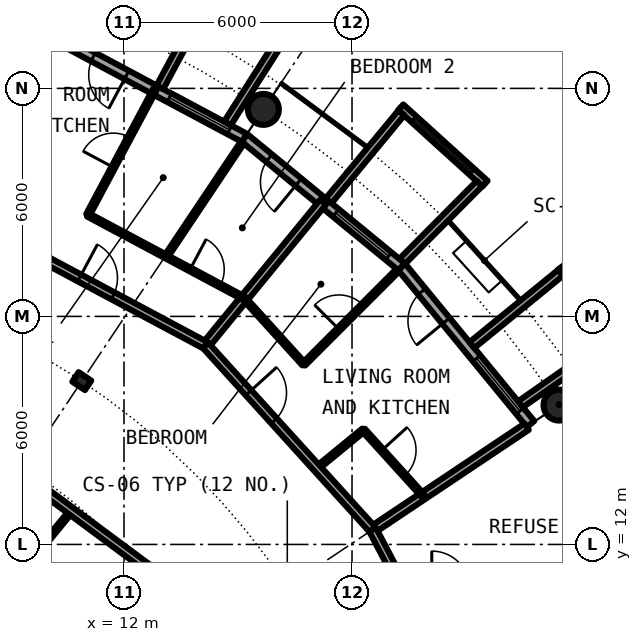
"""IFC4 building model, lengths in metres.
Left out: names, types, materials, properties, quantities, classifications, styles, units other than length and angle.
Written with IfcOpenShell. Run it as: python <this file> out.ifc"""

import sys

from ifc_helpers import new_model, si_unit, direction, frame, frame_2d, origin, origin_2d, place, context, subcontext, project, spatial, rectangle, circle, hollow_circle, i_section, extrude, element, fill, save


model = new_model("IFC4")
c1 = context("Model", 3, precision=1e-05, world=origin(), true_north=direction((0.0, 1.0)))
c2 = subcontext(c1, "Body", "Model", "MODEL_VIEW")
j1 = project(units=[si_unit("LENGTHUNIT", "METRE"), si_unit("PLANEANGLEUNIT", "RADIAN")], contexts=[c1])
p1 = place(None, origin())
s1 = spatial("IfcSite", under=j1, at=p1, CompositionType="ELEMENT")
p2 = place(p1, origin())
s2 = spatial("IfcBuilding", under=s1, at=p2, CompositionType="ELEMENT")
p3 = place(p2, frame((0.0, 0.0, 202.4)))
s3 = spatial("IfcBuildingStorey", under=s2, at=p3, CompositionType="ELEMENT", Elevation=202.4)
for number, where, z_axis, x_axis in (
    (1, (23.448, 15.667, 0.0), (0.0, 0.0, 1.0), (1.0, 0.0, 0.0)),
    (2, (15.667, 23.448, 0.0), (0.0, 0.0, 1.0), (1.0, 0.0, 0.0)),
):
    element("IfcColumn", number, at=place(p3, frame(where, z_axis=z_axis, x_axis=x_axis)), inside=s3, PredefinedType="COLUMN", context=c2, shape_type="SweptSolid", body=[
        extrude(hollow_circle(Radius=0.406, WallThickness=0.03, at=origin_2d()), origin(), (0.0, 0.0, 1.0), 3.05),
    ])
p4 = place(p3, frame((10.889, 16.297, 0.0), z_axis=(0.0, 0.0, 1.0), x_axis=(0.55557023302, 0.831469612303, 0.0)))
e3 = element("IfcColumn", 3, at=p4, inside=s3, PredefinedType="COLUMN", context=c2, shape_type="SweptSolid", body=[
    extrude(i_section(OverallWidth=0.3, OverallDepth=0.4, WebThickness=0.013, FlangeThickness=0.024, FilletRadius=0.027, at=origin_2d()), origin(), (0.0, 0.0, 1.0), 3.05),
])
p5 = place(p3, frame((22.699, 15.167, 0.0), z_axis=(0.0, 0.0, 1.0), x_axis=(-0.634382322723, 0.773019449054, 0.0)))
e4 = element("IfcWall", 4, at=p5, inside=s3, PredefinedType="SOLIDWALL", context=c2, shape_type="SweptSolid", body=[
    extrude(rectangle(XDim=5.352, YDim=0.25, at=frame_2d((2.676, 0.0))), origin(), (0.0, 0.0, 1.0), 2.7),
])
p6 = place(p5, frame((0.441, 0.0, 0.3)))
e5 = element("IfcOpeningElement", 5, at=p6, cuts=e4, PredefinedType="OPENING", context=c2, shape_type="SweptSolid", body=[
    extrude(rectangle(XDim=1.8, YDim=2.1, at=frame_2d((0.9, 1.05))), frame((0.0, 0.135, 0.0), z_axis=(0.0, -1.0, 0.0), x_axis=(1.0, 0.0, 0.0)), (0.0, 0.0, 1.0), 0.27),
])
p7 = place(p5, frame((3.51, 0.0, 0.0)))
e6 = element("IfcOpeningElement", 6, at=p7, cuts=e4, PredefinedType="OPENING", context=c2, shape_type="SweptSolid", body=[
    extrude(rectangle(XDim=1.0, YDim=2.2, at=frame_2d((0.5, 1.1))), frame((0.0, 0.135, 0.0), z_axis=(0.0, -1.0, 0.0), x_axis=(1.0, 0.0, 0.0)), (0.0, 0.0, 1.0), 0.27),
])
p8 = place(p3, frame((24.972, 17.337, -0.03), z_axis=(0.0, 0.0, 1.0), x_axis=(-0.602806268067, 0.797887588059, 0.0)))
e7 = element("IfcWall", 7, at=p8, inside=s3, PredefinedType="SOLIDWALL", context=c2, shape_type="SweptSolid", body=[
    extrude(rectangle(XDim=2.447, YDim=0.2, at=frame_2d((1.223, 0.0))), origin(), (0.0, 0.0, 1.0), 2.73),
])
p9 = place(p8, frame((0.183, 0.0, 0.33)))
e8 = element("IfcOpeningElement", 8, at=p9, cuts=e7, PredefinedType="OPENING", context=c2, shape_type="SweptSolid", body=[
    extrude(circle(Radius=1.04, at=frame_2d((1.04, 1.04))), frame((0.0, 0.11, 0.0), z_axis=(0.0, -1.0, 0.0), x_axis=(1.0, 0.0, 0.0)), (0.0, 0.0, 1.0), 0.22),
])
p10 = place(p3, frame((22.433, 15.688, -0.03), z_axis=(0.0, 0.0, 1.0), x_axis=(0.819373043115, 0.573260687834, 0.0)))
e9 = element("IfcWall", 9, at=p10, inside=s3, PredefinedType="SOLIDWALL", context=c2, shape_type="SweptSolid", body=[
    extrude(rectangle(XDim=2.925, YDim=0.2, at=frame_2d((1.463, 0.0))), origin(), (0.0, 0.0, 1.0), 2.73),
])
p11 = place(p3, frame((21.155, 17.246, -0.03), z_axis=(0.0, 0.0, 1.0), x_axis=(0.775179004516, 0.631741648902, 0.0)))
e10 = element("IfcWall", 10, at=p11, inside=s3, PredefinedType="SOLIDWALL", context=c2, shape_type="SweptSolid", body=[
    extrude(rectangle(XDim=3.006, YDim=0.2, at=frame_2d((1.503, 0.0))), origin(), (0.0, 0.0, 1.0), 2.73),
])
p12 = place(p3, frame((19.304, 19.304, 0.0), z_axis=(0.0, 0.0, 1.0), x_axis=(-0.773019449054, 0.634382322723, 0.0)))
e11 = element("IfcWall", 11, at=p12, inside=s3, PredefinedType="SOLIDWALL", context=c2, shape_type="SweptSolid", body=[
    extrude(rectangle(XDim=5.352, YDim=0.25, at=frame_2d((2.676, 0.0))), origin(), (0.0, 0.0, 1.0), 2.7),
])
p13 = place(p12, frame((0.441, 0.0, 0.3)))
e12 = element("IfcOpeningElement", 12, at=p13, cuts=e11, PredefinedType="OPENING", context=c2, shape_type="SweptSolid", body=[
    extrude(rectangle(XDim=1.8, YDim=2.1, at=frame_2d((0.9, 1.05))), frame((0.0, 0.135, 0.0), z_axis=(0.0, -1.0, 0.0), x_axis=(1.0, 0.0, 0.0)), (0.0, 0.0, 1.0), 0.27),
])
p14 = place(p12, frame((3.51, 0.0, 0.0)))
e13 = element("IfcOpeningElement", 13, at=p14, cuts=e11, PredefinedType="OPENING", context=c2, shape_type="SweptSolid", body=[
    extrude(rectangle(XDim=1.0, YDim=2.2, at=frame_2d((0.5, 1.1))), frame((0.0, 0.135, 0.0), z_axis=(0.0, -1.0, 0.0), x_axis=(1.0, 0.0, 0.0)), (0.0, 0.0, 1.0), 0.27),
])
p15 = place(p3, frame((21.5, 21.493, -0.03), z_axis=(0.0, 0.0, 1.0), x_axis=(-0.740998365753, 0.671506829416, 0.0)))
e14 = element("IfcWall", 14, at=p15, inside=s3, PredefinedType="SOLIDWALL", context=c2, shape_type="SweptSolid", body=[
    extrude(rectangle(XDim=2.993, YDim=0.2, at=frame_2d((1.497, 0.0))), origin(), (0.0, 0.0, 1.0), 2.73),
])
p16 = place(p15, frame((0.457, 0.0, 0.33)))
e15 = element("IfcOpeningElement", 15, at=p16, cuts=e14, PredefinedType="OPENING", context=c2, shape_type="SweptSolid", body=[
    extrude(circle(Radius=1.04, at=frame_2d((1.04, 1.04))), frame((0.0, 0.11, 0.0), z_axis=(0.0, -1.0, 0.0), x_axis=(1.0, 0.0, 0.0)), (0.0, 0.0, 1.0), 0.22),
])
p17 = place(p3, frame((19.323, 19.45, -0.03), z_axis=(0.0, 0.0, 1.0), x_axis=(0.704476739375, 0.709727076896, 0.0)))
e16 = element("IfcWall", 16, at=p17, inside=s3, PredefinedType="SOLIDWALL", context=c2, shape_type="SweptSolid", body=[
    extrude(rectangle(XDim=2.883, YDim=0.2, at=frame_2d((1.441, 0.0))), origin(), (0.0, 0.0, 1.0), 2.73),
])
p18 = place(p3, frame((17.384, 21.041, -0.03), z_axis=(0.0, 0.0, 1.0), x_axis=(0.63709551667, 0.770784861449, 0.0)))
e17 = element("IfcWall", 17, at=p18, inside=s3, PredefinedType="SOLIDWALL", context=c2, shape_type="SweptSolid", body=[
    extrude(rectangle(XDim=3.006, YDim=0.2, at=frame_2d((1.503, 0.0))), origin(), (0.0, 0.0, 1.0), 2.73),
])
p19 = place(p3, frame((15.167, 22.699, 0.0), z_axis=(0.0, 0.0, 1.0), x_axis=(-0.881915646801, 0.471407246368, 0.0)))
e18 = element("IfcWall", 18, at=p19, inside=s3, PredefinedType="SOLIDWALL", context=c2, shape_type="SweptSolid", body=[
    extrude(rectangle(XDim=5.352, YDim=0.25, at=frame_2d((2.676, 0.0))), origin(), (0.0, 0.0, 1.0), 2.7),
])
p20 = place(p19, frame((0.441, 0.0, 0.3)))
e19 = element("IfcOpeningElement", 19, at=p20, cuts=e18, PredefinedType="OPENING", context=c2, shape_type="SweptSolid", body=[
    extrude(rectangle(XDim=1.8, YDim=2.1, at=frame_2d((0.9, 1.05))), frame((0.0, 0.135, 0.0), z_axis=(0.0, -1.0, 0.0), x_axis=(1.0, 0.0, 0.0)), (0.0, 0.0, 1.0), 0.27),
])
p21 = place(p19, frame((3.51, 0.0, 0.0)))
e20 = element("IfcOpeningElement", 20, at=p21, cuts=e18, PredefinedType="OPENING", context=c2, shape_type="SweptSolid", body=[
    extrude(rectangle(XDim=1.0, YDim=2.2, at=frame_2d((0.5, 1.1))), frame((0.0, 0.135, 0.0), z_axis=(0.0, -1.0, 0.0), x_axis=(1.0, 0.0, 0.0)), (0.0, 0.0, 1.0), 0.27),
])
p22 = place(p3, frame((14.722, 23.079, -0.03), z_axis=(0.0, 0.0, 1.0), x_axis=(0.537572179146, 0.843217737129, 0.0)))
e21 = element("IfcWall", 21, at=p22, inside=s3, PredefinedType="SOLIDWALL", context=c2, shape_type="SweptSolid", body=[
    extrude(rectangle(XDim=2.924, YDim=0.2, at=frame_2d((1.462, 0.0))), origin(), (0.0, 0.0, 1.0), 2.73),
])
p23 = place(p3, frame((12.945, 24.029, -0.03), z_axis=(0.0, 0.0, 1.0), x_axis=(0.474424310775, 0.88029629861, 0.0)))
e22 = element("IfcWall", 22, at=p23, inside=s3, PredefinedType="SOLIDWALL", context=c2, shape_type="SweptSolid", body=[
    extrude(rectangle(XDim=3.006, YDim=0.2, at=frame_2d((1.503, 0.0))), origin(), (0.0, 0.0, 1.0), 2.73),
])
p24 = place(p3, frame((4.909, 5.958, 0.0), z_axis=(0.0, 0.0, 1.0), x_axis=(0.635879010442, 0.771788756124, 0.0)))
e23 = element("IfcWall", 23, at=p24, inside=s3, PredefinedType="PARTITIONING", context=c2, shape_type="SweptSolid", body=[
    extrude(rectangle(XDim=8.967, YDim=0.1, at=frame_2d((4.484, 0.0))), origin(), (0.0, 0.0, 1.0), 2.7),
])
p25 = place(p24, frame((6.4, 0.0, 0.0)))
e24 = element("IfcOpeningElement", 24, at=p25, cuts=e23, PredefinedType="OPENING", context=c2, shape_type="SweptSolid", body=[
    extrude(rectangle(XDim=0.9, YDim=2.3, at=frame_2d((0.45, 1.15))), frame((0.0, 0.06, 0.0), z_axis=(0.0, -1.0, 0.0), x_axis=(1.0, 0.0, 0.0)), (0.0, 0.0, 1.0), 0.12),
])
p26 = place(p24, frame((1.917, 0.0, 0.0)))
e25 = element("IfcOpeningElement", 25, at=p26, cuts=e23, PredefinedType="OPENING", context=c2, shape_type="SweptSolid", body=[
    extrude(rectangle(XDim=0.9, YDim=2.3, at=frame_2d((0.45, 1.15))), frame((0.0, 0.06, 0.0), z_axis=(0.0, -1.0, 0.0), x_axis=(1.0, 0.0, 0.0)), (0.0, 0.0, 1.0), 0.12),
])
p27 = place(p3, frame((11.05, 20.673, 0.0), z_axis=(0.0, 0.0, 1.0), x_axis=(0.471372010014, 0.881934480659, 0.0)))
e26 = element("IfcWall", 26, at=p27, inside=s3, PredefinedType="PARTITIONING", context=c2, shape_type="SweptSolid", body=[
    extrude(rectangle(XDim=3.734, YDim=0.1, at=frame_2d((1.867, 0.0))), origin(), (0.0, 0.0, 1.0), 2.7),
])
p28 = place(p27, frame((1.417, 0.0, 0.0)))
e27 = element("IfcOpeningElement", 27, at=p28, cuts=e26, PredefinedType="OPENING", context=c2, shape_type="SweptSolid", body=[
    extrude(rectangle(XDim=0.9, YDim=2.3, at=frame_2d((0.45, 1.15))), frame((0.0, 0.06, 0.0), z_axis=(0.0, -1.0, 0.0), x_axis=(1.0, 0.0, 0.0)), (0.0, 0.0, 1.0), 0.12),
])
p29 = place(p3, frame((13.106, 19.574, 0.0), z_axis=(0.0, 0.0, 1.0), x_axis=(0.556271723484, 0.831000463088, 0.0)))
e28 = element("IfcWall", 28, at=p29, inside=s3, PredefinedType="PARTITIONING", context=c2, shape_type="SweptSolid", body=[
    extrude(rectangle(XDim=3.619, YDim=0.1, at=frame_2d((1.809, 0.0))), origin(), (0.0, 0.0, 1.0), 2.7),
])
p30 = place(p3, frame((14.147, 17.238, 0.0), z_axis=(0.0, 0.0, 1.0), x_axis=(0.634374159378, 0.773026148273, 0.0)))
e29 = element("IfcWall", 29, at=p30, inside=s3, PredefinedType="PARTITIONING", context=c2, shape_type="SweptSolid", body=[
    extrude(rectangle(XDim=4.876, YDim=0.2, at=frame_2d((2.438, 0.0))), origin(), (0.0, 0.0, 1.0), 2.7),
])
p31 = place(p3, frame((16.732, 16.743, 0.0), z_axis=(0.0, 0.0, 1.0), x_axis=(0.706967463531, 0.707246071398, 0.0)))
e30 = element("IfcWall", 30, at=p31, inside=s3, PredefinedType="PARTITIONING", context=c2, shape_type="SweptSolid", body=[
    extrude(rectangle(XDim=3.505, YDim=0.1, at=frame_2d((1.752, 0.0))), origin(), (0.0, 0.0, 1.0), 2.7),
])
p32 = place(p31, frame((1.303, 0.0, 0.0)))
e31 = element("IfcOpeningElement", 31, at=p32, cuts=e30, PredefinedType="OPENING", context=c2, shape_type="SweptSolid", body=[
    extrude(rectangle(XDim=0.9, YDim=2.3, at=frame_2d((0.45, 1.15))), frame((0.0, 0.06, 0.0), z_axis=(0.0, -1.0, 0.0), x_axis=(1.0, 0.0, 0.0)), (0.0, 0.0, 1.0), 0.12),
])
p33 = place(p3, frame((18.542, 12.389, 0.0), z_axis=(0.0, 0.0, 1.0), x_axis=(0.831387096605, 0.55569370664, 0.0)))
e32 = element("IfcWall", 32, at=p33, inside=s3, PredefinedType="PARTITIONING", context=c2, shape_type="SweptSolid", body=[
    extrude(rectangle(XDim=4.875, YDim=0.2, at=frame_2d((2.438, 0.0))), origin(), (0.0, 0.0, 1.0), 2.7),
])
p34 = place(p3, frame((17.077, 14.006, 0.0), z_axis=(0.0, 0.0, 1.0), x_axis=(0.773476341377, 0.633825172528, 0.0)))
e33 = element("IfcWall", 33, at=p34, inside=s3, PredefinedType="PARTITIONING", context=c2, shape_type="SweptSolid", body=[
    extrude(rectangle(XDim=1.584, YDim=0.1, at=frame_2d((0.792, 0.0))), origin(), (0.0, 0.0, 1.0), 2.7),
])
p35 = place(p3, frame((5.137, 16.938, 0.0), z_axis=(0.0, 0.0, 1.0), x_axis=(0.803229232922, -0.595670042371, 0.0)))
e34 = element("IfcWall", 34, at=p35, inside=s3, PredefinedType="PARTITIONING", context=c2, shape_type="SweptSolid", body=[
    extrude(rectangle(XDim=10.224, YDim=0.2, at=frame_2d((5.112, 0.0))), origin(), (0.0, 0.0, 1.0), 2.7),
])
p36 = place(p35, frame((4.612, 0.0, 0.0)))
e35 = element("IfcOpeningElement", 35, at=p36, cuts=e34, PredefinedType="OPENING", context=c2, shape_type="SweptSolid", body=[
    extrude(rectangle(XDim=1.0, YDim=2.3, at=frame_2d((0.5, 1.15))), frame((0.0, 0.11, 0.0), z_axis=(0.0, -1.0, 0.0), x_axis=(1.0, 0.0, 0.0)), (0.0, 0.0, 1.0), 0.22),
])
p37 = place(p3, frame((6.473, 21.34, 0.0), z_axis=(0.0, 0.0, 1.0), x_axis=(0.881869539497, -0.471493494448, 0.0)))
e36 = element("IfcWall", 36, at=p37, inside=s3, PredefinedType="PARTITIONING", context=c2, shape_type="SweptSolid", body=[
    extrude(rectangle(XDim=8.704, YDim=0.2, at=frame_2d((4.352, 0.0))), origin(), (0.0, 0.0, 1.0), 2.7),
])
p38 = place(p37, frame((4.939, 0.0, 0.0)))
e37 = element("IfcOpeningElement", 37, at=p38, cuts=e36, PredefinedType="OPENING", context=c2, shape_type="SweptSolid", body=[
    extrude(rectangle(XDim=1.0, YDim=2.3, at=frame_2d((0.5, 1.15))), frame((0.0, 0.11, 0.0), z_axis=(0.0, -1.0, 0.0), x_axis=(1.0, 0.0, 0.0)), (0.0, 0.0, 1.0), 0.22),
])
p39 = place(p3, frame((14.147, 17.238, 0.0), z_axis=(0.0, 0.0, 1.0), x_axis=(0.671561669125, -0.740948665268, 0.0)))
e38 = element("IfcWall", 38, at=p39, inside=s3, PredefinedType="PARTITIONING", context=c2, shape_type="SweptSolid", body=[
    extrude(rectangle(XDim=6.544, YDim=0.2, at=frame_2d((3.272, 0.0))), origin(), (0.0, 0.0, 1.0), 2.7),
])
p40 = place(p39, frame((1.682, 0.0, 0.0)))
e39 = element("IfcOpeningElement", 39, at=p40, cuts=e38, PredefinedType="OPENING", context=c2, shape_type="SweptSolid", body=[
    extrude(rectangle(XDim=1.0, YDim=2.3, at=frame_2d((0.5, 1.15))), frame((0.0, 0.11, 0.0), z_axis=(0.0, -1.0, 0.0), x_axis=(1.0, 0.0, 0.0)), (0.0, 0.0, 1.0), 0.22),
])
p41 = place(p3, frame((18.542, 12.389, 0.0), z_axis=(0.0, 0.0, 1.0), x_axis=(0.465359652486, -0.885121683068, 0.0)))
e40 = element("IfcWall", 40, at=p41, inside=s3, PredefinedType="PARTITIONING", context=c2, shape_type="SweptSolid", body=[
    extrude(rectangle(XDim=1.665, YDim=0.2, at=frame_2d((0.833, 0.0))), origin(), (0.0, 0.0, 1.0), 2.7),
])
p42 = place(p3, frame((11.05, 20.673, 0.0), z_axis=(0.0, 0.0, 1.0), x_axis=(0.881916280728, -0.471406060405, 0.0)))
e41 = element("IfcWall", 41, at=p42, inside=s3, PredefinedType="PARTITIONING", context=c2, shape_type="SweptSolid", body=[
    extrude(rectangle(XDim=4.663, YDim=0.1, at=frame_2d((2.331, 0.0))), origin(), (0.0, 0.0, 1.0), 2.7),
])
p43 = place(p42, frame((3.047, 0.0, 0.0)))
e42 = element("IfcOpeningElement", 42, at=p43, cuts=e41, PredefinedType="OPENING", context=c2, shape_type="SweptSolid", body=[
    extrude(rectangle(XDim=0.9, YDim=2.3, at=frame_2d((0.45, 1.15))), frame((0.0, 0.06, 0.0), z_axis=(0.0, -1.0, 0.0), x_axis=(1.0, 0.0, 0.0)), (0.0, 0.0, 1.0), 0.12),
])
p44 = place(p3, frame((15.162, 18.475, 0.0), z_axis=(0.0, 0.0, 1.0), x_axis=(0.671528384412, -0.740978831634, 0.0)))
e43 = element("IfcWall", 43, at=p44, inside=s3, PredefinedType="PARTITIONING", context=c2, shape_type="SweptSolid", body=[
    extrude(rectangle(XDim=2.338, YDim=0.1, at=frame_2d((1.169, 0.0))), origin(), (0.0, 0.0, 1.0), 2.7),
])
p45 = place(p3, frame((18.302, 15.01, 0.0), z_axis=(0.0, 0.0, 1.0), x_axis=(0.671637685376, -0.740879760544, 0.0)))
e44 = element("IfcWall", 44, at=p45, inside=s3, PredefinedType="PARTITIONING", context=c2, shape_type="SweptSolid", body=[
    extrude(rectangle(XDim=2.338, YDim=0.1, at=frame_2d((1.169, 0.0))), origin(), (0.0, 0.0, 1.0), 2.7),
])
p46 = place(p45, frame((0.719, 0.0, 0.0)))
e45 = element("IfcOpeningElement", 45, at=p46, cuts=e44, PredefinedType="OPENING", context=c2, shape_type="SweptSolid", body=[
    extrude(rectangle(XDim=0.9, YDim=2.3, at=frame_2d((0.45, 1.15))), frame((0.0, 0.06, 0.0), z_axis=(0.0, -1.0, 0.0), x_axis=(1.0, 0.0, 0.0)), (0.0, 0.0, 1.0), 0.12),
])
p47 = place(p6, origin())
e46 = element("IfcWindow", 46, at=p47, inside=s3, PartitioningType="SINGLE_PANEL", PredefinedType="WINDOW", context=c2, shape_type="SweptSolid", body=[
    extrude(rectangle(XDim=1.8, YDim=2.1, at=frame_2d((0.9, 1.05))), frame((0.0, 0.03, 0.0), z_axis=(0.0, -1.0, 0.0), x_axis=(1.0, 0.0, 0.0)), (0.0, 0.0, 1.0), 0.06),
])
fill(e5, e46)
p48 = place(p7, origin())
e47 = element("IfcDoor", 47, at=p48, inside=s3, OperationType="SINGLE_SWING_LEFT", PredefinedType="DOOR", context=c2, shape_type="SweptSolid", body=[
    extrude(rectangle(XDim=1.0, YDim=2.2, at=frame_2d((0.5, 1.1))), frame((0.0, 0.025, 0.0), z_axis=(0.0, -1.0, 0.0), x_axis=(1.0, 0.0, 0.0)), (0.0, 0.0, 1.0), 0.05),
])
fill(e6, e47)
p49 = place(p13, origin())
e48 = element("IfcWindow", 48, at=p49, inside=s3, PartitioningType="SINGLE_PANEL", PredefinedType="WINDOW", context=c2, shape_type="SweptSolid", body=[
    extrude(rectangle(XDim=1.8, YDim=2.1, at=frame_2d((0.9, 1.05))), frame((0.0, 0.03, 0.0), z_axis=(0.0, -1.0, 0.0), x_axis=(1.0, 0.0, 0.0)), (0.0, 0.0, 1.0), 0.06),
])
fill(e12, e48)
p50 = place(p16, origin())
e49 = element("IfcWindow", 49, at=p50, inside=s3, PartitioningType="SINGLE_PANEL", PredefinedType="WINDOW", context=c2, shape_type="SweptSolid", body=[
    extrude(circle(Radius=1.04, at=frame_2d((1.04, 1.04))), frame((0.0, 0.03, 0.0), z_axis=(0.0, -1.0, 0.0), x_axis=(1.0, 0.0, 0.0)), (0.0, 0.0, 1.0), 0.06),
])
fill(e15, e49)
p51 = place(p14, origin())
e50 = element("IfcDoor", 50, at=p51, inside=s3, OperationType="SINGLE_SWING_LEFT", PredefinedType="DOOR", context=c2, shape_type="SweptSolid", body=[
    extrude(rectangle(XDim=1.0, YDim=2.2, at=frame_2d((0.5, 1.1))), frame((0.0, 0.025, 0.0), z_axis=(0.0, -1.0, 0.0), x_axis=(1.0, 0.0, 0.0)), (0.0, 0.0, 1.0), 0.05),
])
fill(e13, e50)
p52 = place(p20, origin())
e51 = element("IfcWindow", 51, at=p52, inside=s3, PartitioningType="SINGLE_PANEL", PredefinedType="WINDOW", context=c2, shape_type="SweptSolid", body=[
    extrude(rectangle(XDim=1.8, YDim=2.1, at=frame_2d((0.9, 1.05))), frame((0.0, 0.03, 0.0), z_axis=(0.0, -1.0, 0.0), x_axis=(1.0, 0.0, 0.0)), (0.0, 0.0, 1.0), 0.06),
])
fill(e19, e51)
p53 = place(p21, origin())
e52 = element("IfcDoor", 52, at=p53, inside=s3, OperationType="SINGLE_SWING_LEFT", PredefinedType="DOOR", context=c2, shape_type="SweptSolid", body=[
    extrude(rectangle(XDim=1.0, YDim=2.2, at=frame_2d((0.5, 1.1))), frame((0.0, 0.025, 0.0), z_axis=(0.0, -1.0, 0.0), x_axis=(1.0, 0.0, 0.0)), (0.0, 0.0, 1.0), 0.05),
])
fill(e20, e52)
p54 = place(p40, origin())
e53 = element("IfcDoor", 53, at=p54, inside=s3, OperationType="SINGLE_SWING_LEFT", PredefinedType="DOOR", context=c2, shape_type="SweptSolid", body=[
    extrude(rectangle(XDim=1.0, YDim=2.3, at=frame_2d((0.5, 1.15))), frame((0.0, 0.025, 0.0), z_axis=(0.0, -1.0, 0.0), x_axis=(1.0, 0.0, 0.0)), (0.0, 0.0, 1.0), 0.05),
])
fill(e39, e53)
p55 = place(p46, origin())
e54 = element("IfcDoor", 54, at=p55, inside=s3, OperationType="SINGLE_SWING_RIGHT", PredefinedType="DOOR", context=c2, shape_type="SweptSolid", body=[
    extrude(rectangle(XDim=0.9, YDim=2.3, at=frame_2d((0.45, 1.15))), frame((0.0, 0.025, 0.0), z_axis=(0.0, -1.0, 0.0), x_axis=(1.0, 0.0, 0.0)), (0.0, 0.0, 1.0), 0.05),
])
fill(e45, e54)
p56 = place(p32, origin())
e55 = element("IfcDoor", 55, at=p56, inside=s3, OperationType="SINGLE_SWING_RIGHT", PredefinedType="DOOR", context=c2, shape_type="SweptSolid", body=[
    extrude(rectangle(XDim=0.9, YDim=2.3, at=frame_2d((0.45, 1.15))), frame((0.0, 0.025, 0.0), z_axis=(0.0, -1.0, 0.0), x_axis=(1.0, 0.0, 0.0)), (0.0, 0.0, 1.0), 0.05),
])
fill(e31, e55)
p57 = place(p38, origin())
e56 = element("IfcDoor", 56, at=p57, inside=s3, OperationType="SINGLE_SWING_RIGHT", PredefinedType="DOOR", context=c2, shape_type="SweptSolid", body=[
    extrude(rectangle(XDim=1.0, YDim=2.3, at=frame_2d((0.5, 1.15))), frame((0.0, 0.025, 0.0), z_axis=(0.0, -1.0, 0.0), x_axis=(1.0, 0.0, 0.0)), (0.0, 0.0, 1.0), 0.05),
])
fill(e37, e56)
p58 = place(p28, origin())
e57 = element("IfcDoor", 57, at=p58, inside=s3, OperationType="SINGLE_SWING_LEFT", PredefinedType="DOOR", context=c2, shape_type="SweptSolid", body=[
    extrude(rectangle(XDim=0.9, YDim=2.3, at=frame_2d((0.45, 1.15))), frame((0.0, 0.025, 0.0), z_axis=(0.0, -1.0, 0.0), x_axis=(1.0, 0.0, 0.0)), (0.0, 0.0, 1.0), 0.05),
])
fill(e27, e57)
p59 = place(p43, origin())
e58 = element("IfcDoor", 58, at=p59, inside=s3, OperationType="SINGLE_SWING_RIGHT", PredefinedType="DOOR", context=c2, shape_type="SweptSolid", body=[
    extrude(rectangle(XDim=0.9, YDim=2.3, at=frame_2d((0.45, 1.15))), frame((0.0, 0.025, 0.0), z_axis=(0.0, -1.0, 0.0), x_axis=(1.0, 0.0, 0.0)), (0.0, 0.0, 1.0), 0.05),
])
fill(e42, e58)
save(model, sys.argv[1])
